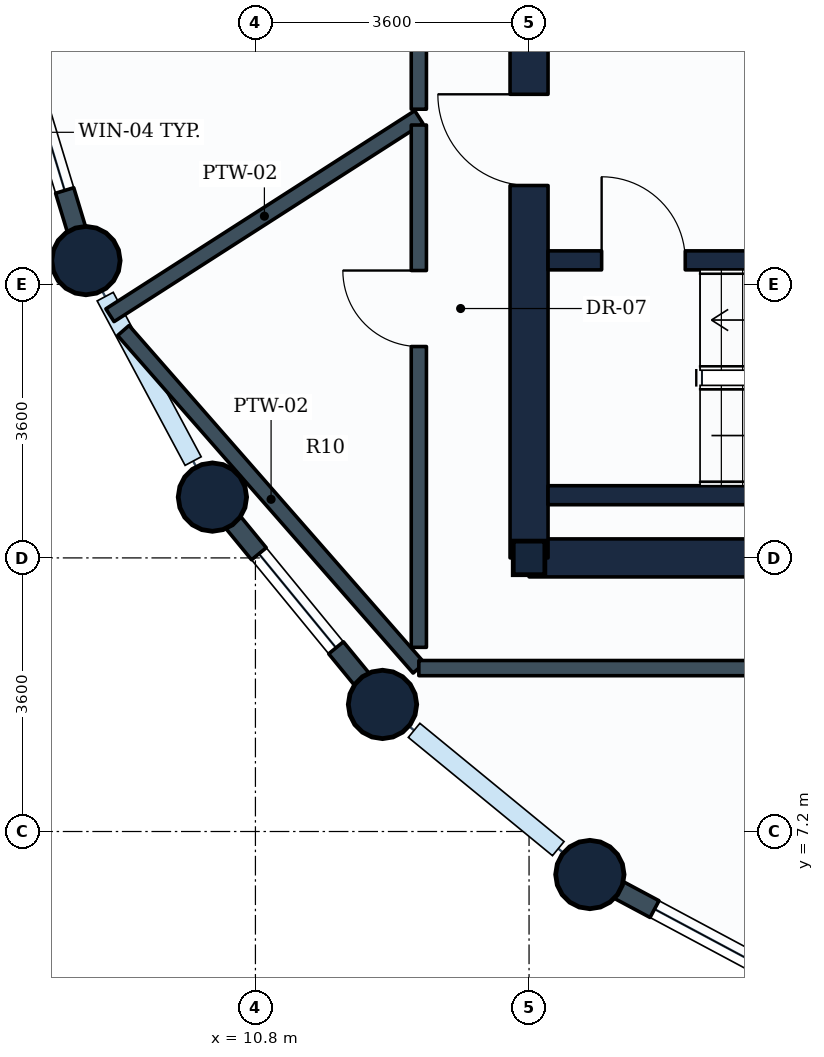
"""IFC4 building model, lengths in metres.
Left out: names, types, materials, properties, quantities, classifications, styles, units other than length and angle.
Written with IfcOpenShell. Run it as: python <this file> out.ifc"""

import sys

from ifc_helpers import new_model, si_unit, direction, frame, frame_2d, origin, origin_2d, place, context, subcontext, project, spatial, rectangle, circle, i_section, extrude, element, fill, save


model = new_model("IFC4")
c1 = context("Model", 3, precision=1e-05, world=origin(), true_north=direction((0.0, 1.0)))
c2 = subcontext(c1, "Body", "Model", "MODEL_VIEW")
j1 = project(units=[si_unit("LENGTHUNIT", "METRE"), si_unit("PLANEANGLEUNIT", "RADIAN")], contexts=[c1])
p1 = place(None, origin())
s1 = spatial("IfcSite", under=j1, at=p1, CompositionType="ELEMENT")
p2 = place(p1, origin())
s2 = spatial("IfcBuilding", under=s1, at=p2, CompositionType="ELEMENT")
p3 = place(p2, frame((0.0, 0.0, 182.4)))
s3 = spatial("IfcBuildingStorey", under=s2, at=p3, CompositionType="ELEMENT", Elevation=182.4)
for number, where, z_axis, x_axis in (
    (1, (8.57, 14.712, 0.0), (0.0, 0.0, 1.0), (1.0, 0.0, 0.0)),
    (2, (10.234, 11.6, 0.0), (0.0, 0.0, 1.0), (1.0, 0.0, 0.0)),
    (3, (12.472, 8.872, 0.0), (0.0, 0.0, 1.0), (1.0, 0.0, 0.0)),
):
    element("IfcColumn", number, at=place(p3, frame(where, z_axis=z_axis, x_axis=x_axis)), inside=s3, PredefinedType="COLUMN", context=c2, shape_type="SweptSolid", body=[
        extrude(circle(Radius=0.45, at=origin_2d()), origin(), (0.0, 0.0, 1.0), 3.8),
    ])
p4 = place(p3, frame((14.4, 10.8, 0.0), z_axis=(0.0, 0.0, 1.0), x_axis=(1.0, 0.0, 0.0)))
e4 = element("IfcColumn", 4, at=p4, inside=s3, PredefinedType="COLUMN", context=c2, shape_type="SweptSolid", body=[
    extrude(i_section(OverallWidth=0.416, OverallDepth=0.442, WebThickness=0.025, FlangeThickness=0.041, FilletRadius=0.015, at=origin_2d()), origin(), (0.0, 0.0, 1.0), 3.8),
])
p5 = place(p3, frame((15.2, 6.634, 0.0), z_axis=(0.0, 0.0, 1.0), x_axis=(1.0, 0.0, 0.0)))
e5 = element("IfcColumn", 5, at=p5, inside=s3, PredefinedType="COLUMN", context=c2, shape_type="SweptSolid", body=[
    extrude(circle(Radius=0.45, at=origin_2d()), origin(), (0.0, 0.0, 1.0), 3.8),
])
p6 = place(p3, frame((8.57, 14.712, 0.0), z_axis=(0.0, 0.0, 1.0), x_axis=(-0.290305086481, 0.956934144423, 0.0)))
e6 = element("IfcWall", 6, at=p6, inside=s3, PredefinedType="STANDARD", context=c2, shape_type="SweptSolid", body=[
    extrude(rectangle(XDim=3.528, YDim=0.25, at=frame_2d((1.764, 0.0))), origin(), (0.0, 0.0, 1.0), 2.93),
])
p7 = place(p6, frame((0.964, 0.0, 0.85)))
e7 = element("IfcOpeningElement", 7, at=p7, cuts=e6, PredefinedType="OPENING", context=c2, shape_type="SweptSolid", body=[
    extrude(rectangle(XDim=1.6, YDim=1.35, at=frame_2d((0.8, 0.675))), frame((0.0, 0.135, 0.0), z_axis=(0.0, -1.0, 0.0), x_axis=(1.0, 0.0, 0.0)), (0.0, 0.0, 1.0), 0.27),
])
p8 = place(p3, frame((12.472, 8.872, 0.0), z_axis=(0.0, 0.0, 1.0), x_axis=(-0.634258295121, 0.773121216285, 0.0)))
e8 = element("IfcWall", 8, at=p8, inside=s3, PredefinedType="STANDARD", context=c2, shape_type="SweptSolid", body=[
    extrude(rectangle(XDim=3.529, YDim=0.25, at=frame_2d((1.764, 0.0))), origin(), (0.0, 0.0, 1.0), 2.93),
])
p9 = place(p8, frame((0.964, 0.0, 0.85)))
e9 = element("IfcOpeningElement", 9, at=p9, cuts=e8, PredefinedType="OPENING", context=c2, shape_type="SweptSolid", body=[
    extrude(rectangle(XDim=1.6, YDim=1.35, at=frame_2d((0.8, 0.675))), frame((0.0, 0.135, 0.0), z_axis=(0.0, -1.0, 0.0), x_axis=(1.0, 0.0, 0.0)), (0.0, 0.0, 1.0), 0.27),
])
p10 = place(p3, frame((18.312, 4.97, 0.0), z_axis=(0.0, 0.0, 1.0), x_axis=(-0.881846862014, 0.471535907389, 0.0)))
e10 = element("IfcWall", 10, at=p10, inside=s3, PredefinedType="STANDARD", context=c2, shape_type="SweptSolid", body=[
    extrude(rectangle(XDim=3.529, YDim=0.25, at=frame_2d((1.765, 0.0))), origin(), (0.0, 0.0, 1.0), 2.93),
])
p11 = place(p10, frame((0.964, 0.0, 0.85)))
e11 = element("IfcOpeningElement", 11, at=p11, cuts=e10, PredefinedType="OPENING", context=c2, shape_type="SweptSolid", body=[
    extrude(rectangle(XDim=1.6, YDim=1.35, at=frame_2d((0.8, 0.675))), frame((0.0, 0.135, 0.0), z_axis=(0.0, -1.0, 0.0), x_axis=(1.0, 0.0, 0.0)), (0.0, 0.0, 1.0), 0.27),
])
p12 = place(p3, frame((14.4, 10.8, 0.0), z_axis=(0.0, 0.0, 1.0), x_axis=(1.0, 0.0, 0.0)))
e12 = element("IfcWall", 12, at=p12, inside=s3, PredefinedType="SHEAR", context=c2, shape_type="SweptSolid", body=[
    extrude(rectangle(XDim=18.0, YDim=0.5, at=frame_2d((9.0, 0.0))), origin(), (0.0, 0.0, 1.0), 3.55),
])
p13 = place(p3, frame((14.4, 10.8, 0.0), z_axis=(0.0, 0.0, 1.0), x_axis=(0.0, 1.0, 0.0)))
e13 = element("IfcWall", 13, at=p13, inside=s3, PredefinedType="SHEAR", context=c2, shape_type="SweptSolid", body=[
    extrude(rectangle(XDim=14.4, YDim=0.5, at=frame_2d((7.2, 0.0))), origin(), (0.0, 0.0, 1.0), 3.55),
])
p14 = place(p13, frame((11.05, 0.0, 0.0)))
e14 = element("IfcOpeningElement", 14, at=p14, cuts=e13, PredefinedType="OPENING", context=c2, shape_type="SweptSolid", body=[
    extrude(rectangle(XDim=1.1, YDim=2.1, at=frame_2d((0.55, 1.05))), frame((0.0, 0.26, 0.0), z_axis=(0.0, -1.0, 0.0), x_axis=(1.0, 0.0, 0.0)), (0.0, 0.0, 1.0), 0.52),
])
p15 = place(p13, frame((4.9, 0.0, 0.0)))
e15 = element("IfcOpeningElement", 15, at=p15, cuts=e13, PredefinedType="OPENING", context=c2, shape_type="SweptSolid", body=[
    extrude(rectangle(XDim=1.2, YDim=2.1, at=frame_2d((0.6, 1.05))), frame((0.0, 0.26, 0.0), z_axis=(0.0, -1.0, 0.0), x_axis=(1.0, 0.0, 0.0)), (0.0, 0.0, 1.0), 0.52),
])
p16 = place(p13, frame((7.5, 0.0, 0.0)))
e16 = element("IfcOpeningElement", 16, at=p16, cuts=e13, PredefinedType="OPENING", context=c2, shape_type="SweptSolid", body=[
    extrude(rectangle(XDim=0.85, YDim=2.1, at=frame_2d((0.425, 1.05))), frame((0.0, 0.26, 0.0), z_axis=(0.0, -1.0, 0.0), x_axis=(1.0, 0.0, 0.0)), (0.0, 0.0, 1.0), 0.52),
])
p17 = place(p3, frame((14.65, 11.625, 0.0), z_axis=(0.0, 0.0, 1.0), x_axis=(1.0, 0.0, 0.0)))
e17 = element("IfcWall", 17, at=p17, inside=s3, PredefinedType="SHEAR", context=c2, shape_type="SweptSolid", body=[
    extrude(rectangle(XDim=8.7, YDim=0.25, at=frame_2d((4.35, 0.0))), origin(), (0.0, 0.0, 1.0), 3.55),
])
p18 = place(p3, frame((14.65, 14.715, 0.0), z_axis=(0.0, 0.0, 1.0), x_axis=(1.0, 0.0, 0.0)))
e18 = element("IfcWall", 18, at=p18, inside=s3, PredefinedType="SHEAR", context=c2, shape_type="SweptSolid", body=[
    extrude(rectangle(XDim=8.7, YDim=0.25, at=frame_2d((4.35, 0.0))), origin(), (0.0, 0.0, 1.0), 3.55),
])
p19 = place(p18, frame((0.705, 0.0, 0.0)))
e19 = element("IfcOpeningElement", 19, at=p19, cuts=e18, PredefinedType="OPENING", context=c2, shape_type="SweptSolid", body=[
    extrude(rectangle(XDim=1.1, YDim=2.1, at=frame_2d((0.55, 1.05))), frame((0.0, 0.135, 0.0), z_axis=(0.0, -1.0, 0.0), x_axis=(1.0, 0.0, 0.0)), (0.0, 0.0, 1.0), 0.27),
])
p20 = place(p3, frame((12.95, 9.35, 0.0), z_axis=(0.0, 0.0, 1.0), x_axis=(-0.658627575343, 0.752469080426, 0.0)))
e20 = element("IfcWall", 20, at=p20, inside=s3, PredefinedType="PARTITIONING", context=c2, shape_type="SweptSolid", body=[
    extrude(rectangle(XDim=5.903, YDim=0.2, at=frame_2d((2.952, 0.0))), origin(), (0.0, 0.0, 1.0), 2.93),
])
p21 = place(p3, frame((12.95, 16.6, 0.0), z_axis=(0.0, 0.0, 1.0), x_axis=(-0.841684109651, -0.539970239515, 0.0)))
e21 = element("IfcWall", 21, at=p21, inside=s3, PredefinedType="PARTITIONING", context=c2, shape_type="SweptSolid", body=[
    extrude(rectangle(XDim=4.828, YDim=0.2, at=frame_2d((2.414, 0.0))), origin(), (0.0, 0.0, 1.0), 2.93),
])
p22 = place(p3, frame((12.95, 16.704, 0.0), z_axis=(0.0, 0.0, 1.0), x_axis=(0.0, 1.0, 0.0)))
e22 = element("IfcWall", 22, at=p22, inside=s3, PredefinedType="PARTITIONING", context=c2, shape_type="SweptSolid", body=[
    extrude(rectangle(XDim=8.417, YDim=0.2, at=frame_2d((4.208, 0.0))), origin(), (0.0, 0.0, 1.0), 3.22),
])
p23 = place(p22, frame((3.696, 0.0, 0.0)))
e23 = element("IfcOpeningElement", 23, at=p23, cuts=e22, PredefinedType="OPENING", context=c2, shape_type="SweptSolid", body=[
    extrude(rectangle(XDim=1.0, YDim=2.1, at=frame_2d((0.5, 1.05))), frame((0.0, 0.11, 0.0), z_axis=(0.0, -1.0, 0.0), x_axis=(1.0, 0.0, 0.0)), (0.0, 0.0, 1.0), 0.22),
])
p24 = place(p3, frame((12.95, 9.623, 0.0), z_axis=(0.0, 0.0, 1.0), x_axis=(0.0, 1.0, 0.0)))
e24 = element("IfcWall", 24, at=p24, inside=s3, PredefinedType="PARTITIONING", context=c2, shape_type="SweptSolid", body=[
    extrude(rectangle(XDim=6.873, YDim=0.2, at=frame_2d((3.437, 0.0))), origin(), (0.0, 0.0, 1.0), 3.17),
])
p25 = place(p24, frame((3.958, 0.0, 0.0)))
e25 = element("IfcOpeningElement", 25, at=p25, cuts=e24, PredefinedType="OPENING", context=c2, shape_type="SweptSolid", body=[
    extrude(rectangle(XDim=1.0, YDim=2.1, at=frame_2d((0.5, 1.05))), frame((0.0, 0.11, 0.0), z_axis=(0.0, -1.0, 0.0), x_axis=(1.0, 0.0, 0.0)), (0.0, 0.0, 1.0), 0.22),
])
p26 = place(p3, frame((12.95, 9.35, 0.0), z_axis=(0.0, 0.0, 1.0), x_axis=(1.0, 0.0, 0.0)))
e26 = element("IfcWall", 26, at=p26, inside=s3, PredefinedType="PARTITIONING", context=c2, shape_type="SweptSolid", body=[
    extrude(rectangle(XDim=15.771, YDim=0.2, at=frame_2d((7.885, 0.0))), origin(), (0.0, 0.0, 1.0), 3.17),
])
p27 = place(p26, frame((4.836, 0.0, 0.0)))
e27 = element("IfcOpeningElement", 27, at=p27, cuts=e26, PredefinedType="OPENING", context=c2, shape_type="SweptSolid", body=[
    extrude(rectangle(XDim=1.0, YDim=2.1, at=frame_2d((0.5, 1.05))), frame((0.0, 0.11, 0.0), z_axis=(0.0, -1.0, 0.0), x_axis=(1.0, 0.0, 0.0)), (0.0, 0.0, 1.0), 0.22),
])
p28 = place(p7, origin())
e28 = element("IfcWindow", 28, at=p28, inside=s3, PartitioningType="SINGLE_PANEL", PredefinedType="WINDOW", context=c2, shape_type="SweptSolid", body=[
    extrude(rectangle(XDim=1.6, YDim=1.35, at=frame_2d((0.8, 0.675))), frame((0.0, 0.03, 0.0), z_axis=(0.0, -1.0, 0.0), x_axis=(1.0, 0.0, 0.0)), (0.0, 0.0, 1.0), 0.06),
])
fill(e7, e28)
p29 = place(p9, origin())
e29 = element("IfcWindow", 29, at=p29, inside=s3, PartitioningType="SINGLE_PANEL", PredefinedType="WINDOW", context=c2, shape_type="SweptSolid", body=[
    extrude(rectangle(XDim=1.6, YDim=1.35, at=frame_2d((0.8, 0.675))), frame((0.0, 0.03, 0.0), z_axis=(0.0, -1.0, 0.0), x_axis=(1.0, 0.0, 0.0)), (0.0, 0.0, 1.0), 0.06),
])
fill(e9, e29)
p30 = place(p11, origin())
e30 = element("IfcWindow", 30, at=p30, inside=s3, PartitioningType="SINGLE_PANEL", PredefinedType="WINDOW", context=c2, shape_type="SweptSolid", body=[
    extrude(rectangle(XDim=1.6, YDim=1.35, at=frame_2d((0.8, 0.675))), frame((0.0, 0.03, 0.0), z_axis=(0.0, -1.0, 0.0), x_axis=(1.0, 0.0, 0.0)), (0.0, 0.0, 1.0), 0.06),
])
fill(e11, e30)
p31 = place(p19, origin())
e31 = element("IfcDoor", 31, at=p31, inside=s3, OperationType="SINGLE_SWING_LEFT", PredefinedType="DOOR", context=c2, shape_type="SweptSolid", body=[
    extrude(rectangle(XDim=1.1, YDim=2.1, at=frame_2d((0.55, 1.05))), frame((0.0, 0.025, 0.0), z_axis=(0.0, -1.0, 0.0), x_axis=(1.0, 0.0, 0.0)), (0.0, 0.0, 1.0), 0.05),
])
fill(e19, e31)
p32 = place(p15, origin())
e32 = element("IfcDoor", 32, at=p32, inside=s3, OperationType="SINGLE_SWING_RIGHT", PredefinedType="DOOR", context=c2, shape_type="SweptSolid", body=[
    extrude(rectangle(XDim=1.2, YDim=2.1, at=frame_2d((0.6, 1.05))), frame((0.0, 0.025, 0.0), z_axis=(0.0, -1.0, 0.0), x_axis=(1.0, 0.0, 0.0)), (0.0, 0.0, 1.0), 0.05),
])
fill(e15, e32)
p33 = place(p25, origin())
e33 = element("IfcDoor", 33, at=p33, inside=s3, OperationType="SINGLE_SWING_RIGHT", PredefinedType="DOOR", context=c2, shape_type="SweptSolid", body=[
    extrude(rectangle(XDim=1.0, YDim=2.1, at=frame_2d((0.5, 1.05))), frame((0.0, 0.025, 0.0), z_axis=(0.0, -1.0, 0.0), x_axis=(1.0, 0.0, 0.0)), (0.0, 0.0, 1.0), 0.05),
])
fill(e25, e33)
save(model, sys.argv[1])
